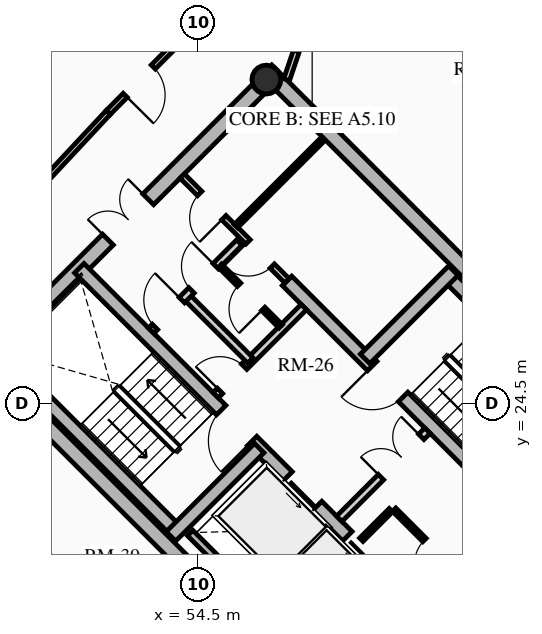
"""IFC4 building model, lengths in metres.
Left out: names, types, materials, properties, quantities, classifications, styles, units other than length and angle.
Written with IfcOpenShell. Run it as: python <this file> out.ifc"""

import sys

from ifc_helpers import new_model, si_unit, direction, frame, frame_2d, origin, origin_2d, place, context, subcontext, project, spatial, rectangle, hollow_circle, extrude, source, transform, mapped, element, fill, save


model = new_model("IFC4")
c1 = context("Model", 3, precision=1e-05, world=origin(), true_north=direction((0.0, 1.0)))
c2 = subcontext(c1, "Body", "Model", "MODEL_VIEW")
j1 = project(units=[si_unit("LENGTHUNIT", "METRE"), si_unit("PLANEANGLEUNIT", "RADIAN")], contexts=[c1])
p1 = place(None, origin())
s1 = spatial("IfcSite", under=j1, at=p1, CompositionType="ELEMENT")
p2 = place(p1, origin())
s2 = spatial("IfcBuilding", under=s1, at=p2, CompositionType="ELEMENT")
p3 = place(p2, frame((0.0, 0.0, 180.7)))
s3 = spatial("IfcBuildingStorey", under=s2, at=p3, CompositionType="ELEMENT", Elevation=180.7)
for number, where, z_axis, x_axis in (
    (1, (58.702, 15.732, 0.0), (0.0, 0.0, 1.0), (-0.707, 0.707, 0.0)),
    (2, (66.268, 23.298, 0.0), (0.0, 0.0, 1.0), (-0.707, 0.707, 0.0)),
):
    element("IfcWall", number, at=place(p3, frame(where, z_axis=z_axis, x_axis=x_axis)), inside=s3, PredefinedType="SHEAR", context=c2, shape_type="SweptSolid", body=[
        extrude(rectangle(XDim=14.1, YDim=0.4, at=frame_2d((7.05, 0.0))), origin(), (0.0, 0.0, 1.0), 2.91),
    ])
p4 = place(p3, frame((58.561, 15.873, 0.0), z_axis=(0.0, 0.0, 1.0), x_axis=(0.707106781187, 0.707106781187, 0.0)))
e3 = element("IfcWall", 3, at=p4, inside=s3, PredefinedType="SHEAR", context=c2, shape_type="SweptSolid", body=[
    extrude(rectangle(XDim=10.7, YDim=0.4, at=frame_2d((5.35, 0.0))), origin(), (0.0, 0.0, 1.0), 2.91),
])
m1 = source(origin(), c2, "Body", "SweptSolid", [
    extrude(rectangle(XDim=1.5, YDim=2.02, at=frame_2d((0.75, 1.01))), frame((0.0, 0.21, 0.0), z_axis=(0.0, -1.0, 0.0), x_axis=(1.0, 0.0, 0.0)), (0.0, 0.0, 1.0), 0.42),
])
p5 = place(p4, frame((5.45, 0.0, 0.0)))
e4 = element("IfcOpeningElement", 4, at=p5, cuts=e3, PredefinedType="OPENING", context=c2, shape_type="MappedRepresentation", body=[
    mapped(m1, transform((0.0, 0.0, 0.0), x_axis=(1.0, 0.0, 0.0), y_axis=(0.0, 1.0, 0.0), z_axis=(0.0, 0.0, 1.0), scale=1.0)),
])
p6 = place(p3, frame((48.873, 25.561, 0.0), z_axis=(0.0, 0.0, 1.0), x_axis=(0.707106781187, 0.707106781187, 0.0)))
e5 = element("IfcWall", 5, at=p6, inside=s3, PredefinedType="SHEAR", context=c2, shape_type="SweptSolid", body=[
    extrude(rectangle(XDim=10.7, YDim=0.4, at=frame_2d((5.35, 0.0))), origin(), (0.0, 0.0, 1.0), 2.91),
])
p7 = place(p6, frame((4.6, 0.0, 0.0)))
e6 = element("IfcOpeningElement", 6, at=p7, cuts=e5, PredefinedType="OPENING", context=c2, shape_type="MappedRepresentation", body=[
    mapped(m1, transform((0.0, 0.0, 0.0), x_axis=(1.0, 0.0, 0.0), y_axis=(0.0, 1.0, 0.0), z_axis=(0.0, 0.0, 1.0), scale=1.0)),
])
p8 = place(p3, frame((61.06, 18.373, 0.0), z_axis=(0.0, 0.0, 1.0), x_axis=(-0.707106781187, 0.707106781187, 0.0)))
e7 = element("IfcWall", 7, at=p8, inside=s3, PredefinedType="SHEAR", context=c2, shape_type="SweptSolid", body=[
    extrude(rectangle(XDim=13.7, YDim=0.35, at=frame_2d((6.85, 0.0))), origin(), (0.0, 0.0, 1.0), 2.91),
])
m2 = source(origin(), c2, "Body", "SweptSolid", [
    extrude(rectangle(XDim=1.1, YDim=2.015, at=frame_2d((0.55, 1.007))), frame((0.0, 0.185, 0.0), z_axis=(0.0, -1.0, 0.0), x_axis=(1.0, 0.0, 0.0)), (0.0, 0.0, 1.0), 0.37),
])
p9 = place(p8, frame((4.85, 0.0, 0.0)))
e8 = element("IfcOpeningElement", 8, at=p9, cuts=e7, PredefinedType="OPENING", context=c2, shape_type="MappedRepresentation", body=[
    mapped(m2, transform((0.0, 0.0, 0.0), x_axis=(1.0, 0.0, 0.0), y_axis=(0.0, 1.0, 0.0), z_axis=(0.0, 0.0, 1.0), scale=1.0)),
])
p10 = place(p8, frame((0.625, 0.0, 0.0)))
e9 = element("IfcOpeningElement", 9, at=p10, cuts=e7, PredefinedType="OPENING", context=c2, shape_type="MappedRepresentation", body=[
    mapped(m2, transform((0.0, 0.0, 0.0), x_axis=(1.0, 0.0, 0.0), y_axis=(0.0, 1.0, 0.0), z_axis=(0.0, 0.0, 1.0), scale=1.0)),
])
p11 = place(p8, frame((2.625, 0.0, 0.0)))
e10 = element("IfcOpeningElement", 10, at=p11, cuts=e7, PredefinedType="OPENING", context=c2, shape_type="MappedRepresentation", body=[
    mapped(m2, transform((0.0, 0.0, 0.0), x_axis=(1.0, 0.0, 0.0), y_axis=(0.0, 1.0, 0.0), z_axis=(0.0, 0.0, 1.0), scale=1.0)),
])
m3 = source(origin(), c2, "Body", "SweptSolid", [
    extrude(rectangle(XDim=1.15, YDim=2.02, at=frame_2d((0.575, 1.01))), frame((0.0, 0.185, 0.0), z_axis=(0.0, -1.0, 0.0), x_axis=(1.0, 0.0, 0.0)), (0.0, 0.0, 1.0), 0.37),
])
p12 = place(p8, frame((7.27, 0.0, 0.0)))
e11 = element("IfcOpeningElement", 11, at=p12, cuts=e7, PredefinedType="OPENING", context=c2, shape_type="MappedRepresentation", body=[
    mapped(m3, transform((0.0, 0.0, 0.0), x_axis=(1.0, 0.0, 0.0), y_axis=(0.0, 1.0, 0.0), z_axis=(0.0, 0.0, 1.0), scale=1.0)),
])
p13 = place(p3, frame((63.627, 20.94, 0.0), z_axis=(0.0, 0.0, 1.0), x_axis=(-0.707119496762, 0.707094065383, 0.0)))
e12 = element("IfcWall", 12, at=p13, inside=s3, PredefinedType="SHEAR", context=c2, shape_type="SweptSolid", body=[
    extrude(rectangle(XDim=9.6, YDim=0.35, at=frame_2d((4.8, 0.0))), origin(), (0.0, 0.0, 1.0), 2.91),
])
p14 = place(p13, frame((5.28, 0.0, 0.0)))
e13 = element("IfcOpeningElement", 13, at=p14, cuts=e12, PredefinedType="OPENING", context=c2, shape_type="MappedRepresentation", body=[
    mapped(m3, transform((0.0, 0.0, 0.0), x_axis=(1.0, 0.0, 0.0), y_axis=(0.0, 1.0, 0.0), z_axis=(0.0, 0.0, 1.0), scale=1.0)),
])
p15 = place(p3, frame((53.922, 21.141, 0.0), z_axis=(0.0, 0.0, 1.0), x_axis=(-0.707106781187, 0.707106781187, 0.0)))
e14 = element("IfcWall", 14, at=p15, inside=s3, PredefinedType="SHEAR", context=c2, shape_type="SweptSolid", body=[
    extrude(rectangle(XDim=6.695, YDim=0.35, at=frame_2d((3.348, 0.0))), origin(), (0.0, 0.0, 1.0), 2.91),
])
p16 = place(p3, frame((53.784, 21.003, 0.0), z_axis=(0.0, 0.0, 1.0), x_axis=(0.707106781187, 0.707106781187, 0.0)))
e15 = element("IfcWall", 15, at=p16, inside=s3, PredefinedType="SHEAR", context=c2, shape_type="SweptSolid", body=[
    extrude(rectangle(XDim=3.285, YDim=0.35, at=frame_2d((1.643, 0.0))), origin(), (0.0, 0.0, 1.0), 2.91),
])
p17 = place(p3, frame((65.812, 23.125, 0.0), z_axis=(0.0, 0.0, 1.0), x_axis=(-0.707106781187, 0.707106781187, 0.0)))
e16 = element("IfcWall", 16, at=p17, inside=s3, PredefinedType="SHEAR", context=c2, shape_type="SweptSolid", body=[
    extrude(rectangle(XDim=6.695, YDim=0.35, at=frame_2d((3.348, 0.0))), origin(), (0.0, 0.0, 1.0), 2.91),
])
p18 = place(p3, frame((58.893, 25.674, 0.0), z_axis=(0.0, 0.0, 1.0), x_axis=(0.707106781187, 0.707106781187, 0.0)))
e17 = element("IfcWall", 17, at=p18, inside=s3, PredefinedType="SHEAR", context=c2, shape_type="SweptSolid", body=[
    extrude(rectangle(XDim=3.285, YDim=0.35, at=frame_2d((1.643, 0.0))), origin(), (0.0, 0.0, 1.0), 2.91),
])
p19 = place(p3, frame((56.294, 33.024, 0.0), z_axis=(0.0, 0.0, 1.0), x_axis=(0.707106781187, 0.707106781187, 0.0)))
e18 = element("IfcColumn", 18, at=p19, inside=s3, PredefinedType="COLUMN", context=c2, shape_type="SweptSolid", body=[
    extrude(hollow_circle(Radius=0.38, WallThickness=0.032, at=origin_2d()), origin(), (0.0, 0.0, 1.0), 2.91),
])
p20 = place(p3, frame((55.888, 19.069, 0.0), z_axis=(0.0, 0.0, 1.0), x_axis=(0.707106781187, 0.707106781187, 0.0)))
e19 = element("IfcWall", 19, at=p20, inside=s3, PredefinedType="SHEAR", context=c2, shape_type="SweptSolid", body=[
    extrude(rectangle(XDim=2.97, YDim=0.2, at=frame_2d((1.485, 0.0))), origin(), (0.0, 0.0, 1.0), 2.91),
])
p21 = place(p3, frame((56.015, 19.366, 0.0), z_axis=(0.0, 0.0, 1.0), x_axis=(-0.707106781187, 0.707106781187, 0.0)))
e20 = element("IfcWall", 20, at=p21, inside=s3, PredefinedType="SHEAR", context=c2, shape_type="SweptSolid", body=[
    extrude(rectangle(XDim=2.44, YDim=0.2, at=frame_2d((1.22, 0.0))), origin(), (0.0, 0.0, 1.0), 2.91),
])
p22 = place(p3, frame((58.214, 21.467, 0.0), z_axis=(0.0, 0.0, 1.0), x_axis=(0.707106781187, 0.707106781187, 0.0)))
e21 = element("IfcWall", 21, at=p22, inside=s3, PredefinedType="PARTITIONING", context=c2, shape_type="SweptSolid", body=[
    extrude(rectangle(XDim=3.28, YDim=0.2, at=frame_2d((1.64, 0.0))), origin(), (0.0, 0.0, 1.0), 2.675),
])
m4 = source(origin(), c2, "Body", "SweptSolid", [
    extrude(rectangle(XDim=1.5, YDim=2.02, at=frame_2d((0.75, 1.01))), frame((0.0, 0.11, 0.0), z_axis=(0.0, -1.0, 0.0), x_axis=(1.0, 0.0, 0.0)), (0.0, 0.0, 1.0), 0.22),
])
p23 = place(p22, frame((1.55, 0.0, 0.0)))
e22 = element("IfcOpeningElement", 22, at=p23, cuts=e21, PredefinedType="OPENING", context=c2, shape_type="MappedRepresentation", body=[
    mapped(m4, transform((0.0, 0.0, 0.0), x_axis=(1.0, 0.0, 0.0), y_axis=(0.0, 1.0, 0.0), z_axis=(0.0, 0.0, 1.0), scale=1.0)),
])
p24 = place(p3, frame((54.961, 24.719, 0.0), z_axis=(0.0, 0.0, 1.0), x_axis=(0.707106781187, 0.707106781187, 0.0)))
e23 = element("IfcWall", 23, at=p24, inside=s3, PredefinedType="PARTITIONING", context=c2, shape_type="SweptSolid", body=[
    extrude(rectangle(XDim=3.28, YDim=0.2, at=frame_2d((1.64, 0.0))), origin(), (0.0, 0.0, 1.0), 2.675),
])
m5 = source(origin(), c2, "Body", "SweptSolid", [
    extrude(rectangle(XDim=0.9, YDim=2.005, at=frame_2d((0.45, 1.002))), frame((0.0, 0.11, 0.0), z_axis=(0.0, -1.0, 0.0), x_axis=(1.0, 0.0, 0.0)), (0.0, 0.0, 1.0), 0.22),
])
p25 = place(p24, frame((0.16, 0.0, 0.0)))
e24 = element("IfcOpeningElement", 24, at=p25, cuts=e23, PredefinedType="OPENING", context=c2, shape_type="MappedRepresentation", body=[
    mapped(m5, transform((0.0, 0.0, 0.0), x_axis=(1.0, 0.0, 0.0), y_axis=(0.0, 1.0, 0.0), z_axis=(0.0, 0.0, 1.0), scale=1.0)),
])
p26 = place(p3, frame((55.874, 25.631, 0.0), z_axis=(0.0, 0.0, 1.0), x_axis=(-0.707157639372, 0.707055919343, 0.0)))
e25 = element("IfcWall", 25, at=p26, inside=s3, PredefinedType="PARTITIONING", context=c2, shape_type="SweptSolid", body=[
    extrude(rectangle(XDim=2.4, YDim=0.2, at=frame_2d((1.2, 0.0))), origin(), (0.0, 0.0, 1.0), 2.675),
])
p27 = place(p3, frame((53.264, 26.416, 0.0), z_axis=(0.0, 0.0, 1.0), x_axis=(0.707106781187, 0.707106781187, 0.0)))
e26 = element("IfcWall", 26, at=p27, inside=s3, PredefinedType="PARTITIONING", context=c2, shape_type="SweptSolid", body=[
    extrude(rectangle(XDim=3.28, YDim=0.2, at=frame_2d((1.64, 0.0))), origin(), (0.0, 0.0, 1.0), 2.675),
])
m6 = source(origin(), c2, "Body", "SweptSolid", [
    extrude(rectangle(XDim=1.0, YDim=2.015, at=frame_2d((0.5, 1.007))), frame((0.0, 0.11, 0.0), z_axis=(0.0, -1.0, 0.0), x_axis=(1.0, 0.0, 0.0)), (0.0, 0.0, 1.0), 0.22),
])
p28 = place(p27, frame((0.14, 0.0, 0.0)))
e27 = element("IfcOpeningElement", 27, at=p28, cuts=e26, PredefinedType="OPENING", context=c2, shape_type="MappedRepresentation", body=[
    mapped(m6, transform((0.0, 0.0, 0.0), x_axis=(1.0, 0.0, 0.0), y_axis=(0.0, 1.0, 0.0), z_axis=(0.0, 0.0, 1.0), scale=1.0)),
])
p29 = place(p27, frame((1.5, 0.0, 0.0)))
e28 = element("IfcOpeningElement", 28, at=p29, cuts=e26, PredefinedType="OPENING", context=c2, shape_type="MappedRepresentation", body=[
    mapped(m5, transform((0.0, 0.0, 0.0), x_axis=(1.0, 0.0, 0.0), y_axis=(0.0, 1.0, 0.0), z_axis=(0.0, 0.0, 1.0), scale=1.0)),
])
p30 = place(p3, frame((61.835, 19.529, 0.0), z_axis=(0.0, 0.0, 1.0), x_axis=(-0.707146413884, 0.707067146267, 0.0)))
e29 = element("IfcWall", 29, at=p30, inside=s3, PredefinedType="PARTITIONING", context=c2, shape_type="SweptSolid", body=[
    extrude(rectangle(XDim=3.08, YDim=0.125, at=frame_2d((1.54, 0.0))), origin(), (0.0, 0.0, 1.0), 2.675),
])
m7 = source(origin(), c2, "Body", "SweptSolid", [
    extrude(rectangle(XDim=0.9, YDim=2.005, at=frame_2d((0.45, 1.002))), frame((0.0, 0.073, 0.0), z_axis=(0.0, -1.0, 0.0), x_axis=(1.0, 0.0, 0.0)), (0.0, 0.0, 1.0), 0.145),
])
p31 = place(p30, frame((1.05, 0.0, 0.0)))
e30 = element("IfcOpeningElement", 30, at=p31, cuts=e29, PredefinedType="OPENING", context=c2, shape_type="MappedRepresentation", body=[
    mapped(m7, transform((0.0, 0.0, 0.0), x_axis=(1.0, 0.0, 0.0), y_axis=(0.0, 1.0, 0.0), z_axis=(0.0, 0.0, 1.0), scale=1.0)),
])
p32 = place(p3, frame((58.794, 20.915, 0.0), z_axis=(0.0, 0.0, 1.0), x_axis=(0.707106781187, 0.707106781187, 0.0)))
e31 = element("IfcWall", 31, at=p32, inside=s3, PredefinedType="PARTITIONING", context=c2, shape_type="SweptSolid", body=[
    extrude(rectangle(XDim=1.1, YDim=0.125, at=frame_2d((0.55, 0.0))), origin(), (0.0, 0.0, 1.0), 2.675),
])
p33 = place(p3, frame((56.673, 26.529, 0.0), z_axis=(0.0, 0.0, 1.0), x_axis=(-0.707052764397, 0.70716079385, 0.0)))
e32 = element("IfcWall", 32, at=p33, inside=s3, PredefinedType="PARTITIONING", context=c2, shape_type="SweptSolid", body=[
    extrude(rectangle(XDim=2.26, YDim=0.125, at=frame_2d((1.13, 0.0))), origin(), (0.0, 0.0, 1.0), 2.675),
])
p34 = place(p33, frame((0.65, 0.0, 0.0)))
e33 = element("IfcOpeningElement", 33, at=p34, cuts=e32, PredefinedType="OPENING", context=c2, shape_type="MappedRepresentation", body=[
    mapped(m7, transform((0.0, 0.0, 0.0), x_axis=(1.0, 0.0, 0.0), y_axis=(0.0, 1.0, 0.0), z_axis=(0.0, 0.0, 1.0), scale=1.0)),
])
p35 = place(p3, frame((56.839, 27.728, 0.0), z_axis=(0.0, 0.0, 1.0), x_axis=(-0.707106781187, 0.707106781187, 0.0)))
e34 = element("IfcWall", 34, at=p35, inside=s3, PredefinedType="PARTITIONING", context=c2, shape_type="SweptSolid", body=[
    extrude(rectangle(XDim=3.9, YDim=0.16, at=frame_2d((1.95, 0.0))), origin(), (0.0, 0.0, 1.0), 2.675),
])
m8 = source(origin(), c2, "Body", "SweptSolid", [
    extrude(rectangle(XDim=0.9, YDim=2.005, at=frame_2d((0.45, 1.002))), frame((0.0, 0.09, 0.0), z_axis=(0.0, -1.0, 0.0), x_axis=(1.0, 0.0, 0.0)), (0.0, 0.0, 1.0), 0.18),
])
p36 = place(p35, frame((0.55, 0.0, 0.0)))
e35 = element("IfcOpeningElement", 35, at=p36, cuts=e34, PredefinedType="OPENING", context=c2, shape_type="MappedRepresentation", body=[
    mapped(m8, transform((0.0, 0.0, 0.0), x_axis=(1.0, 0.0, 0.0), y_axis=(0.0, 1.0, 0.0), z_axis=(0.0, 0.0, 1.0), scale=1.0)),
])
p37 = place(p35, frame((2.35, 0.0, 0.0)))
e36 = element("IfcOpeningElement", 36, at=p37, cuts=e34, PredefinedType="OPENING", context=c2, shape_type="MappedRepresentation", body=[
    mapped(m8, transform((0.0, 0.0, 0.0), x_axis=(1.0, 0.0, 0.0), y_axis=(0.0, 1.0, 0.0), z_axis=(0.0, 0.0, 1.0), scale=1.0)),
])
p38 = place(p3, frame((55.492, 29.167, 0.0), z_axis=(0.0, 0.0, 1.0), x_axis=(0.707144688645, 0.707068871696, 0.0)))
e37 = element("IfcWall", 37, at=p38, inside=s3, PredefinedType="PARTITIONING", context=c2, shape_type="SweptSolid", body=[
    extrude(rectangle(XDim=3.22, YDim=0.125, at=frame_2d((1.61, 0.0))), origin(), (0.0, 0.0, 1.0), 2.212),
])
p39 = place(p3, frame((54.488, 34.535, 0.0), z_axis=(0.0, 0.0, 1.0), x_axis=(-0.703666289339, -0.710530613871, 0.0)))
e38 = element("IfcWall", 38, at=p39, inside=s3, PredefinedType="PARTITIONING", context=c2, shape_type="SweptSolid", body=[
    extrude(rectangle(XDim=3.343, YDim=0.15, at=frame_2d((1.672, 0.0))), origin(), (0.0, 0.0, 1.0), 2.245),
])
m9 = source(origin(), c2, "Body", "SweptSolid", [
    extrude(rectangle(XDim=1.05, YDim=2.015, at=frame_2d((0.525, 1.007))), frame((0.0, 0.085, 0.0), z_axis=(0.0, -1.0, 0.0), x_axis=(1.0, 0.0, 0.0)), (0.0, 0.0, 1.0), 0.17),
])
p40 = place(p39, frame((1.66, 0.0, 0.0)))
e39 = element("IfcOpeningElement", 39, at=p40, cuts=e38, PredefinedType="OPENING", context=c2, shape_type="MappedRepresentation", body=[
    mapped(m9, transform((0.0, 0.0, 0.0), x_axis=(1.0, 0.0, 0.0), y_axis=(0.0, 1.0, 0.0), z_axis=(0.0, 0.0, 1.0), scale=1.0)),
])
p41 = place(p3, frame((52.135, 32.159, 0.0), z_axis=(0.0, 0.0, 1.0), x_axis=(-0.682546302454, -0.730842353047, 0.0)))
e40 = element("IfcWall", 40, at=p41, inside=s3, PredefinedType="PARTITIONING", context=c2, shape_type="SweptSolid", body=[
    extrude(rectangle(XDim=6.445, YDim=0.15, at=frame_2d((3.223, 0.0))), origin(), (0.0, 0.0, 1.0), 2.245),
])
p42 = place(p3, frame((47.844, 23.253, 0.0), z_axis=(0.0, 0.0, 1.0), x_axis=(0.696248411352, -0.717800912293, 0.0)))
e41 = element("IfcWall", 41, at=p42, inside=s3, PredefinedType="PARTITIONING", context=c2, shape_type="SweptSolid", body=[
    extrude(rectangle(XDim=5.947, YDim=0.15, at=frame_2d((2.974, 0.0))), origin(), (0.0, 0.0, 1.0), 2.675),
])
p43 = place(p3, frame((56.828, 33.021, 0.0), z_axis=(0.0, 0.0, 1.0), x_axis=(0.321300161671, 0.94697740528, 0.0)))
e42 = element("IfcWall", 42, at=p43, inside=s3, PredefinedType="PARTITIONING", context=c2, shape_type="SweptSolid", body=[
    extrude(rectangle(XDim=2.049, YDim=0.16, at=frame_2d((1.024, 0.0))), origin(), (0.0, 0.0, 1.0), 2.245),
])
m10 = source(origin(), c2, "Body", "SweptSolid", [
    extrude(rectangle(XDim=1.05, YDim=2.015, at=frame_2d((0.525, 1.007))), frame((0.0, 0.09, 0.0), z_axis=(0.0, -1.0, 0.0), x_axis=(1.0, 0.0, 0.0)), (0.0, 0.0, 1.0), 0.18),
])
p44 = place(p43, frame((0.798, 0.0, 0.0)))
e43 = element("IfcOpeningElement", 43, at=p44, cuts=e42, PredefinedType="OPENING", context=c2, shape_type="MappedRepresentation", body=[
    mapped(m10, transform((0.0, 0.0, 0.0), x_axis=(1.0, 0.0, 0.0), y_axis=(0.0, 1.0, 0.0), z_axis=(0.0, 0.0, 1.0), scale=1.0)),
])
p45 = place(p3, frame((46.991, 22.071, 0.0), z_axis=(0.0, 0.0, 1.0), x_axis=(0.675455872419, -0.737400409828, 0.0)))
e44 = element("IfcWall", 44, at=p45, inside=s3, PredefinedType="PARTITIONING", context=c2, shape_type="SweptSolid", body=[
    extrude(rectangle(XDim=5.719, YDim=0.125, at=frame_2d((2.859, 0.0))), origin(), (0.0, 0.0, 1.0), 2.675),
])
m11 = source(origin(), c2, "Body", "SweptSolid", [
    extrude(rectangle(XDim=1.1, YDim=2.015, at=frame_2d((0.55, 1.007))), frame((0.0, 0.025, 0.0), z_axis=(0.0, -1.0, 0.0), x_axis=(1.0, 0.0, 0.0)), (0.0, 0.0, 1.0), 0.05),
])
p46 = place(p9, origin())
e45 = element("IfcDoor", 45, at=p46, inside=s3, OperationType="SLIDING_TO_LEFT", PredefinedType="DOOR", context=c2, shape_type="MappedRepresentation", body=[
    mapped(m11, transform((0.0, 0.0, 0.0), x_axis=(1.0, 0.0, 0.0), y_axis=(0.0, 1.0, 0.0), z_axis=(0.0, 0.0, 1.0), scale=1.0)),
])
fill(e8, e45)
p47 = place(p11, origin())
e46 = element("IfcDoor", 46, at=p47, inside=s3, OperationType="SLIDING_TO_LEFT", PredefinedType="DOOR", context=c2, shape_type="MappedRepresentation", body=[
    mapped(m11, transform((0.0, 0.0, 0.0), x_axis=(1.0, 0.0, 0.0), y_axis=(0.0, 1.0, 0.0), z_axis=(0.0, 0.0, 1.0), scale=1.0)),
])
fill(e10, e46)
m12 = source(origin(), c2, "Body", "SweptSolid", [
    extrude(rectangle(XDim=1.15, YDim=2.02, at=frame_2d((0.575, 1.01))), frame((0.0, 0.025, 0.0), z_axis=(0.0, -1.0, 0.0), x_axis=(1.0, 0.0, 0.0)), (0.0, 0.0, 1.0), 0.05),
])
p48 = place(p12, origin())
e47 = element("IfcDoor", 47, at=p48, inside=s3, OperationType="SINGLE_SWING_LEFT", PredefinedType="DOOR", context=c2, shape_type="MappedRepresentation", body=[
    mapped(m12, transform((0.0, 0.0, 0.0), x_axis=(1.0, 0.0, 0.0), y_axis=(0.0, 1.0, 0.0), z_axis=(0.0, 0.0, 1.0), scale=1.0)),
])
fill(e11, e47)
p49 = place(p14, origin())
e48 = element("IfcDoor", 48, at=p49, inside=s3, OperationType="SINGLE_SWING_RIGHT", PredefinedType="DOOR", context=c2, shape_type="MappedRepresentation", body=[
    mapped(m12, transform((0.0, 0.0, 0.0), x_axis=(1.0, 0.0, 0.0), y_axis=(0.0, 1.0, 0.0), z_axis=(0.0, 0.0, 1.0), scale=1.0)),
])
fill(e13, e48)
m13 = source(origin(), c2, "Body", "SweptSolid", [
    extrude(rectangle(XDim=1.5, YDim=2.02, at=frame_2d((0.75, 1.01))), frame((0.0, 0.025, 0.0), z_axis=(0.0, -1.0, 0.0), x_axis=(1.0, 0.0, 0.0)), (0.0, 0.0, 1.0), 0.05),
])
p50 = place(p7, origin())
e49 = element("IfcDoor", 49, at=p50, inside=s3, OperationType="DOUBLE_DOOR_SINGLE_SWING", PredefinedType="DOOR", context=c2, shape_type="MappedRepresentation", body=[
    mapped(m13, transform((0.0, 0.0, 0.0), x_axis=(1.0, 0.0, 0.0), y_axis=(0.0, 1.0, 0.0), z_axis=(0.0, 0.0, 1.0), scale=1.0)),
])
fill(e6, e49)
p51 = place(p23, origin())
e50 = element("IfcDoor", 50, at=p51, inside=s3, OperationType="DOUBLE_DOOR_SINGLE_SWING", PredefinedType="DOOR", context=c2, shape_type="MappedRepresentation", body=[
    mapped(m13, transform((0.0, 0.0, 0.0), x_axis=(1.0, 0.0, 0.0), y_axis=(0.0, 1.0, 0.0), z_axis=(0.0, 0.0, 1.0), scale=1.0)),
])
fill(e22, e50)
m14 = source(origin(), c2, "Body", "SweptSolid", [
    extrude(rectangle(XDim=0.9, YDim=2.005, at=frame_2d((0.45, 1.002))), frame((0.0, 0.025, 0.0), z_axis=(0.0, -1.0, 0.0), x_axis=(1.0, 0.0, 0.0)), (0.0, 0.0, 1.0), 0.05),
])
p52 = place(p25, origin())
e51 = element("IfcDoor", 51, at=p52, inside=s3, OperationType="SINGLE_SWING_LEFT", PredefinedType="DOOR", context=c2, shape_type="MappedRepresentation", body=[
    mapped(m14, transform((0.0, 0.0, 0.0), x_axis=(1.0, 0.0, 0.0), y_axis=(0.0, 1.0, 0.0), z_axis=(0.0, 0.0, 1.0), scale=1.0)),
])
fill(e24, e51)
m15 = source(origin(), c2, "Body", "SweptSolid", [
    extrude(rectangle(XDim=1.0, YDim=2.015, at=frame_2d((0.5, 1.007))), frame((0.0, 0.025, 0.0), z_axis=(0.0, -1.0, 0.0), x_axis=(1.0, 0.0, 0.0)), (0.0, 0.0, 1.0), 0.05),
])
p53 = place(p28, origin())
e52 = element("IfcDoor", 52, at=p53, inside=s3, OperationType="SINGLE_SWING_RIGHT", PredefinedType="DOOR", context=c2, shape_type="MappedRepresentation", body=[
    mapped(m15, transform((0.0, 0.0, 0.0), x_axis=(1.0, 0.0, 0.0), y_axis=(0.0, 1.0, 0.0), z_axis=(0.0, 0.0, 1.0), scale=1.0)),
])
fill(e27, e52)
p54 = place(p31, origin())
e53 = element("IfcDoor", 53, at=p54, inside=s3, OperationType="SINGLE_SWING_LEFT", PredefinedType="DOOR", context=c2, shape_type="MappedRepresentation", body=[
    mapped(m14, transform((0.0, 0.0, 0.0), x_axis=(1.0, 0.0, 0.0), y_axis=(0.0, 1.0, 0.0), z_axis=(0.0, 0.0, 1.0), scale=1.0)),
])
fill(e30, e53)
p55 = place(p29, origin())
e54 = element("IfcDoor", 54, at=p55, inside=s3, OperationType="SINGLE_SWING_RIGHT", PredefinedType="DOOR", context=c2, shape_type="MappedRepresentation", body=[
    mapped(m14, transform((0.0, 0.0, 0.0), x_axis=(1.0, 0.0, 0.0), y_axis=(0.0, 1.0, 0.0), z_axis=(0.0, 0.0, 1.0), scale=1.0)),
])
fill(e28, e54)
p56 = place(p34, origin())
e55 = element("IfcDoor", 55, at=p56, inside=s3, OperationType="SINGLE_SWING_LEFT", PredefinedType="DOOR", context=c2, shape_type="MappedRepresentation", body=[
    mapped(m14, transform((0.0, 0.0, 0.0), x_axis=(1.0, 0.0, 0.0), y_axis=(0.0, 1.0, 0.0), z_axis=(0.0, 0.0, 1.0), scale=1.0)),
])
fill(e33, e55)
p57 = place(p36, origin())
e56 = element("IfcDoor", 56, at=p57, inside=s3, OperationType="SINGLE_SWING_RIGHT", PredefinedType="DOOR", context=c2, shape_type="MappedRepresentation", body=[
    mapped(m14, transform((0.0, 0.0, 0.0), x_axis=(1.0, 0.0, 0.0), y_axis=(0.0, 1.0, 0.0), z_axis=(0.0, 0.0, 1.0), scale=1.0)),
])
fill(e35, e56)
p58 = place(p37, origin())
e57 = element("IfcDoor", 57, at=p58, inside=s3, OperationType="SINGLE_SWING_LEFT", PredefinedType="DOOR", context=c2, shape_type="MappedRepresentation", body=[
    mapped(m14, transform((0.0, 0.0, 0.0), x_axis=(1.0, 0.0, 0.0), y_axis=(0.0, 1.0, 0.0), z_axis=(0.0, 0.0, 1.0), scale=1.0)),
])
fill(e36, e57)
m16 = source(origin(), c2, "Body", "SweptSolid", [
    extrude(rectangle(XDim=1.05, YDim=2.015, at=frame_2d((0.525, 1.007))), frame((0.0, 0.025, 0.0), z_axis=(0.0, -1.0, 0.0), x_axis=(1.0, 0.0, 0.0)), (0.0, 0.0, 1.0), 0.05),
])
p59 = place(p40, origin())
e58 = element("IfcDoor", 58, at=p59, inside=s3, OperationType="SINGLE_SWING_RIGHT", PredefinedType="DOOR", context=c2, shape_type="MappedRepresentation", body=[
    mapped(m16, transform((0.0, 0.0, 0.0), x_axis=(1.0, 0.0, 0.0), y_axis=(0.0, 1.0, 0.0), z_axis=(0.0, 0.0, 1.0), scale=1.0)),
])
fill(e39, e58)
save(model, sys.argv[1])
